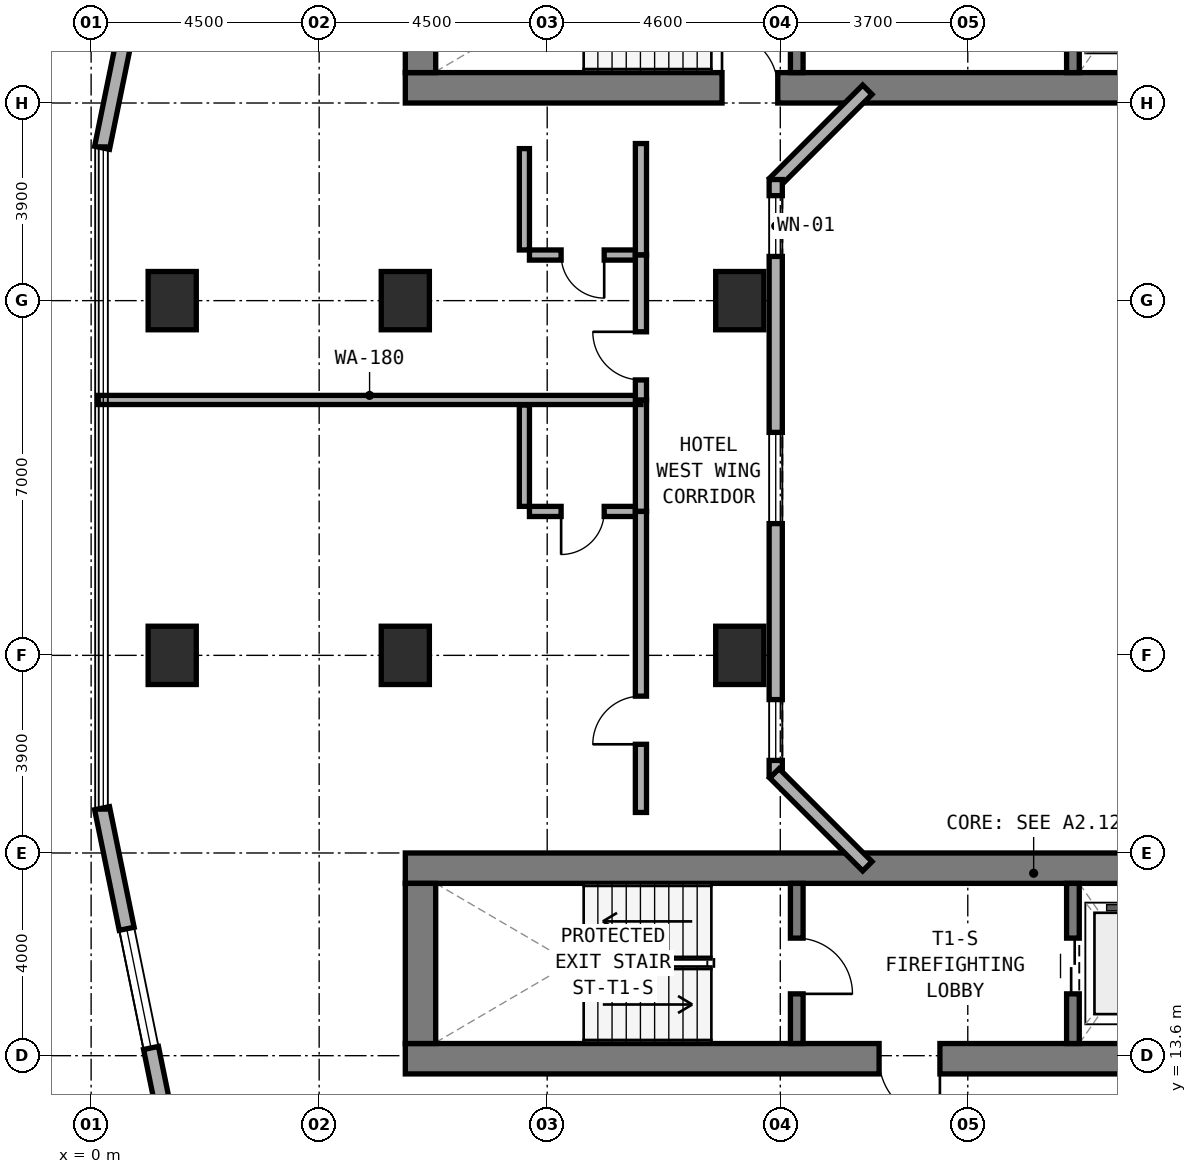
"""IFC4 building model, lengths in metres.
Left out: names, types, materials, properties, quantities, classifications, styles, units other than length and angle.
Written with IfcOpenShell. Run it as: python <this file> out.ifc"""

import sys

from ifc_helpers import new_model, si_unit, direction, frame, frame_2d, origin, origin_2d, place, context, subcontext, project, spatial, rectangle, extrude, element, fill, save


model = new_model("IFC4")
c1 = context("Model", 3, precision=1e-05, world=origin(), true_north=direction((0.0, 1.0)))
c2 = subcontext(c1, "Body", "Model", "MODEL_VIEW")
j1 = project(units=[si_unit("LENGTHUNIT", "METRE"), si_unit("PLANEANGLEUNIT", "RADIAN")], contexts=[c1])
p1 = place(None, origin())
s1 = spatial("IfcSite", under=j1, at=p1, CompositionType="ELEMENT")
p2 = place(p1, origin())
s2 = spatial("IfcBuilding", under=s1, at=p2, CompositionType="ELEMENT")
p3 = place(p2, frame((0.0, 0.0, 45.0)))
s3 = spatial("IfcBuildingStorey", under=s2, at=p3, CompositionType="ELEMENT", Elevation=45.0)
p4 = place(p3, frame((6.2, 32.7, 0.0), z_axis=(0.0, 0.0, 1.0), x_axis=(1.0, 0.0, 0.0)))
e1 = element("IfcWall", 1, at=p4, inside=s3, PredefinedType="SHEAR", context=c2, shape_type="SweptSolid", body=[
    extrude(rectangle(XDim=24.8, YDim=0.6, at=frame_2d((12.4, 0.0))), origin(), (0.0, 0.0, 1.0), 3.5),
])
p5 = place(p4, frame((6.25, 0.0, 0.0)))
e2 = element("IfcOpeningElement", 2, at=p5, cuts=e1, PredefinedType="OPENING", context=c2, shape_type="SweptSolid", body=[
    extrude(rectangle(XDim=1.1, YDim=2.15, at=frame_2d((0.55, 1.075))), frame((0.0, 0.31, 0.0), z_axis=(0.0, -1.0, 0.0), x_axis=(1.0, 0.0, 0.0)), (0.0, 0.0, 1.0), 0.62),
])
p6 = place(p3, frame((6.5, 33.0, 0.0), z_axis=(0.0, 0.0, 1.0), x_axis=(0.0, 1.0, 0.0)))
e3 = element("IfcWall", 3, at=p6, inside=s3, PredefinedType="SHEAR", context=c2, shape_type="SweptSolid", body=[
    extrude(rectangle(XDim=3.16, YDim=0.6, at=frame_2d((1.58, 0.0))), origin(), (0.0, 0.0, 1.0), 3.5),
])
p7 = place(p3, frame((13.925, 33.0, 0.0), z_axis=(0.0, 0.0, 1.0), x_axis=(0.0, 1.0, 0.0)))
e4 = element("IfcWall", 4, at=p7, inside=s3, PredefinedType="STANDARD", context=c2, shape_type="SweptSolid", body=[
    extrude(rectangle(XDim=3.16, YDim=0.25, at=frame_2d((1.58, 0.0))), origin(), (0.0, 0.0, 1.0), 3.22),
])
p8 = place(p7, frame((0.98, 0.0, 0.0)))
e5 = element("IfcOpeningElement", 5, at=p8, cuts=e4, PredefinedType="OPENING", context=c2, shape_type="SweptSolid", body=[
    extrude(rectangle(XDim=1.1, YDim=2.15, at=frame_2d((0.55, 1.075))), frame((0.0, 0.135, 0.0), z_axis=(0.0, -1.0, 0.0), x_axis=(1.0, 0.0, 0.0)), (0.0, 0.0, 1.0), 0.27),
])
p9 = place(p3, frame((19.375, 33.0, 0.0), z_axis=(0.0, 0.0, 1.0), x_axis=(0.0, 1.0, 0.0)))
e6 = element("IfcWall", 6, at=p9, inside=s3, PredefinedType="STANDARD", context=c2, shape_type="SweptSolid", body=[
    extrude(rectangle(XDim=3.16, YDim=0.25, at=frame_2d((1.58, 0.0))), origin(), (0.0, 0.0, 1.0), 3.22),
])
p10 = place(p9, frame((0.98, 0.0, 0.0)))
e7 = element("IfcOpeningElement", 7, at=p10, cuts=e6, PredefinedType="OPENING", context=c2, shape_type="SweptSolid", body=[
    extrude(rectangle(XDim=1.1, YDim=2.15, at=frame_2d((0.55, 1.075))), frame((0.0, 0.135, 0.0), z_axis=(0.0, -1.0, 0.0), x_axis=(1.0, 0.0, 0.0)), (0.0, 0.0, 1.0), 0.27),
])
p11 = place(p3, frame((6.2, 13.54, 0.0), z_axis=(0.0, 0.0, 1.0), x_axis=(1.0, 0.0, 0.0)))
e8 = element("IfcWall", 8, at=p11, inside=s3, PredefinedType="SHEAR", context=c2, shape_type="SweptSolid", body=[
    extrude(rectangle(XDim=24.8, YDim=0.6, at=frame_2d((12.4, 0.0))), origin(), (0.0, 0.0, 1.0), 3.5),
])
p12 = place(p11, frame((9.35, 0.0, 0.0)))
e9 = element("IfcOpeningElement", 9, at=p12, cuts=e8, PredefinedType="OPENING", context=c2, shape_type="SweptSolid", body=[
    extrude(rectangle(XDim=1.2, YDim=2.15, at=frame_2d((0.6, 1.075))), frame((0.0, 0.31, 0.0), z_axis=(0.0, -1.0, 0.0), x_axis=(1.0, 0.0, 0.0)), (0.0, 0.0, 1.0), 0.62),
])
p13 = place(p11, frame((17.14, 0.0, 0.0)))
e10 = element("IfcOpeningElement", 10, at=p13, cuts=e8, PredefinedType="OPENING", context=c2, shape_type="SweptSolid", body=[
    extrude(rectangle(XDim=0.85, YDim=2.1, at=frame_2d((0.425, 1.05))), frame((0.0, 0.31, 0.0), z_axis=(0.0, -1.0, 0.0), x_axis=(1.0, 0.0, 0.0)), (0.0, 0.0, 1.0), 0.62),
])
p14 = place(p3, frame((6.2, 17.3, 0.0), z_axis=(0.0, 0.0, 1.0), x_axis=(1.0, 0.0, 0.0)))
e11 = element("IfcWall", 11, at=p14, inside=s3, PredefinedType="SHEAR", context=c2, shape_type="SweptSolid", body=[
    extrude(rectangle(XDim=24.8, YDim=0.6, at=frame_2d((12.4, 0.0))), origin(), (0.0, 0.0, 1.0), 3.5),
])
p15 = place(p3, frame((6.5, 13.84, 0.0), z_axis=(0.0, 0.0, 1.0), x_axis=(0.0, 1.0, 0.0)))
e12 = element("IfcWall", 12, at=p15, inside=s3, PredefinedType="SHEAR", context=c2, shape_type="SweptSolid", body=[
    extrude(rectangle(XDim=3.16, YDim=0.6, at=frame_2d((1.58, 0.0))), origin(), (0.0, 0.0, 1.0), 3.5),
])
p16 = place(p3, frame((13.925, 13.84, 0.0), z_axis=(0.0, 0.0, 1.0), x_axis=(0.0, 1.0, 0.0)))
e13 = element("IfcWall", 13, at=p16, inside=s3, PredefinedType="STANDARD", context=c2, shape_type="SweptSolid", body=[
    extrude(rectangle(XDim=3.16, YDim=0.25, at=frame_2d((1.58, 0.0))), origin(), (0.0, 0.0, 1.0), 3.22),
])
p17 = place(p16, frame((0.98, 0.0, 0.0)))
e14 = element("IfcOpeningElement", 14, at=p17, cuts=e13, PredefinedType="OPENING", context=c2, shape_type="SweptSolid", body=[
    extrude(rectangle(XDim=1.1, YDim=2.15, at=frame_2d((0.55, 1.075))), frame((0.0, 0.135, 0.0), z_axis=(0.0, -1.0, 0.0), x_axis=(1.0, 0.0, 0.0)), (0.0, 0.0, 1.0), 0.27),
])
p18 = place(p3, frame((19.375, 13.84, 0.0), z_axis=(0.0, 0.0, 1.0), x_axis=(0.0, 1.0, 0.0)))
e15 = element("IfcWall", 15, at=p18, inside=s3, PredefinedType="STANDARD", context=c2, shape_type="SweptSolid", body=[
    extrude(rectangle(XDim=3.16, YDim=0.25, at=frame_2d((1.58, 0.0))), origin(), (0.0, 0.0, 1.0), 3.22),
])
p19 = place(p18, frame((0.98, 0.0, 0.0)))
e16 = element("IfcOpeningElement", 16, at=p19, cuts=e15, PredefinedType="OPENING", context=c2, shape_type="SweptSolid", body=[
    extrude(rectangle(XDim=1.1, YDim=2.15, at=frame_2d((0.55, 1.075))), frame((0.0, 0.135, 0.0), z_axis=(0.0, -1.0, 0.0), x_axis=(1.0, 0.0, 0.0)), (0.0, 0.0, 1.0), 0.27),
])
for number, where, z_axis, x_axis in (
    (17, (6.2, 21.5, 0.0), (0.0, 0.0, 1.0), (1.0, 0.0, 0.0)),
    (18, (6.2, 28.5, 0.0), (0.0, 0.0, 1.0), (1.0, 0.0, 0.0)),
    (19, (12.8, 21.5, 0.0), (0.0, 0.0, 1.0), (1.0, 0.0, 0.0)),
    (20, (12.8, 28.5, 0.0), (0.0, 0.0, 1.0), (1.0, 0.0, 0.0)),
    (21, (1.6, 21.5, 0.0), (0.0, 0.0, 1.0), (1.0, 0.0, 0.0)),
    (22, (1.6, 28.5, 0.0), (0.0, 0.0, 1.0), (1.0, 0.0, 0.0)),
):
    element("IfcColumn", number, at=place(p3, frame(where, z_axis=z_axis, x_axis=x_axis)), inside=s3, PredefinedType="COLUMN", context=c2, shape_type="SweptSolid", body=[
        extrude(rectangle(XDim=0.95, YDim=1.15, at=origin_2d()), origin(), (0.0, 0.0, 1.0), 3.5),
    ])
p20 = place(p3, frame((2.229, 41.378, 0.0), z_axis=(0.0, 0.0, 1.0), x_axis=(-0.199990901713, -0.979797754249, 0.0)))
e23 = element("IfcWall", 23, at=p20, inside=s3, PredefinedType="STANDARD", context=c2, shape_type="SweptSolid", body=[
    extrude(rectangle(XDim=10.065, YDim=0.3, at=frame_2d((5.033, 0.0))), origin(), (0.0, 0.0, 1.0), 3.22),
])
p21 = place(p20, frame((0.378, 0.0, 0.85)))
e24 = element("IfcOpeningElement", 24, at=p21, cuts=e23, PredefinedType="OPENING", context=c2, shape_type="SweptSolid", body=[
    extrude(rectangle(XDim=1.8, YDim=1.5, at=frame_2d((0.9, 0.75))), frame((0.0, 0.16, 0.0), z_axis=(0.0, -1.0, 0.0), x_axis=(1.0, 0.0, 0.0)), (0.0, 0.0, 1.0), 0.32),
])
p22 = place(p20, frame((5.236, 0.0, 0.8)))
e25 = element("IfcOpeningElement", 25, at=p22, cuts=e23, PredefinedType="OPENING", context=c2, shape_type="SweptSolid", body=[
    extrude(rectangle(XDim=2.4, YDim=1.6, at=frame_2d((1.2, 0.8))), frame((0.0, 0.16, 0.0), z_axis=(0.0, -1.0, 0.0), x_axis=(1.0, 0.0, 0.0)), (0.0, 0.0, 1.0), 0.32),
])
p23 = place(p3, frame((0.216, 18.484, 0.0), z_axis=(0.0, 0.0, 1.0), x_axis=(0.199990901713, -0.979797754249, 0.0)))
e26 = element("IfcWall", 26, at=p23, inside=s3, PredefinedType="STANDARD", context=c2, shape_type="SweptSolid", body=[
    extrude(rectangle(XDim=10.065, YDim=0.3, at=frame_2d((5.033, 0.0))), origin(), (0.0, 0.0, 1.0), 3.22),
])
p24 = place(p23, frame((2.429, 0.0, 0.8)))
e27 = element("IfcOpeningElement", 27, at=p24, cuts=e26, PredefinedType="OPENING", context=c2, shape_type="SweptSolid", body=[
    extrude(rectangle(XDim=2.4, YDim=1.6, at=frame_2d((1.2, 0.8))), frame((0.0, 0.16, 0.0), z_axis=(0.0, -1.0, 0.0), x_axis=(1.0, 0.0, 0.0)), (0.0, 0.0, 1.0), 0.32),
])
p25 = place(p23, frame((7.887, 0.0, 0.85)))
e28 = element("IfcOpeningElement", 28, at=p25, cuts=e26, PredefinedType="OPENING", context=c2, shape_type="SweptSolid", body=[
    extrude(rectangle(XDim=1.8, YDim=1.5, at=frame_2d((0.9, 0.75))), frame((0.0, 0.16, 0.0), z_axis=(0.0, -1.0, 0.0), x_axis=(1.0, 0.0, 0.0)), (0.0, 0.0, 1.0), 0.32),
])
p26 = place(p3, frame((15.318, 32.662, 0.0), z_axis=(0.0, 0.0, 1.0), x_axis=(-0.707106781187, -0.707106781187, 0.0)))
e29 = element("IfcWall", 29, at=p26, inside=s3, PredefinedType="STANDARD", context=c2, shape_type="SweptSolid", body=[
    extrude(rectangle(XDim=2.594, YDim=0.26, at=frame_2d((1.297, 0.0))), origin(), (0.0, 0.0, 1.0), 3.22),
])
p27 = place(p3, frame((13.51, 30.89, 0.0), z_axis=(0.0, 0.0, 1.0), x_axis=(0.0, -1.0, 0.0)))
e30 = element("IfcWall", 30, at=p27, inside=s3, PredefinedType="STANDARD", context=c2, shape_type="SweptSolid", body=[
    extrude(rectangle(XDim=11.78, YDim=0.26, at=frame_2d((5.89, 0.0))), origin(), (0.0, 0.0, 1.0), 3.22),
])
p28 = place(p27, frame((0.318, 0.0, 0.85)))
e31 = element("IfcOpeningElement", 31, at=p28, cuts=e30, PredefinedType="OPENING", context=c2, shape_type="SweptSolid", body=[
    extrude(rectangle(XDim=1.2, YDim=1.5, at=frame_2d((0.6, 0.75))), frame((0.0, 0.14, 0.0), z_axis=(0.0, -1.0, 0.0), x_axis=(1.0, 0.0, 0.0)), (0.0, 0.0, 1.0), 0.28),
])
p29 = place(p27, frame((4.99, 0.0, 0.85)))
e32 = element("IfcOpeningElement", 32, at=p29, cuts=e30, PredefinedType="OPENING", context=c2, shape_type="SweptSolid", body=[
    extrude(rectangle(XDim=1.8, YDim=1.5, at=frame_2d((0.9, 0.75))), frame((0.0, 0.14, 0.0), z_axis=(0.0, -1.0, 0.0), x_axis=(1.0, 0.0, 0.0)), (0.0, 0.0, 1.0), 0.28),
])
p30 = place(p27, frame((10.263, 0.0, 0.85)))
e33 = element("IfcOpeningElement", 33, at=p30, cuts=e30, PredefinedType="OPENING", context=c2, shape_type="SweptSolid", body=[
    extrude(rectangle(XDim=1.2, YDim=1.5, at=frame_2d((0.6, 0.75))), frame((0.0, 0.14, 0.0), z_axis=(0.0, -1.0, 0.0), x_axis=(1.0, 0.0, 0.0)), (0.0, 0.0, 1.0), 0.28),
])
p31 = place(p3, frame((13.484, 19.172, 0.0), z_axis=(0.0, 0.0, 1.0), x_axis=(0.707106781187, -0.707106781187, 0.0)))
e34 = element("IfcWall", 34, at=p31, inside=s3, PredefinedType="STANDARD", context=c2, shape_type="SweptSolid", body=[
    extrude(rectangle(XDim=2.594, YDim=0.26, at=frame_2d((1.297, 0.0))), origin(), (0.0, 0.0, 1.0), 3.22),
])
p32 = place(p3, frame((8.65, 24.34, 0.0), z_axis=(0.0, 0.0, 1.0), x_axis=(1.0, 0.0, 0.0)))
e35 = element("IfcWall", 35, at=p32, inside=s3, PredefinedType="PLUMBINGWALL", context=c2, shape_type="SweptSolid", body=[
    extrude(rectangle(XDim=2.1, YDim=0.2, at=frame_2d((1.05, 0.0))), origin(), (0.0, 0.0, 1.0), 3.22),
])
p33 = place(p32, frame((0.625, 0.0, 0.0)))
e36 = element("IfcOpeningElement", 36, at=p33, cuts=e35, PredefinedType="OPENING", context=c2, shape_type="SweptSolid", body=[
    extrude(rectangle(XDim=0.85, YDim=2.1, at=frame_2d((0.425, 1.05))), frame((0.0, 0.11, 0.0), z_axis=(0.0, -1.0, 0.0), x_axis=(1.0, 0.0, 0.0)), (0.0, 0.0, 1.0), 0.22),
])
p34 = place(p3, frame((8.55, 24.44, 0.0), z_axis=(0.0, 0.0, 1.0), x_axis=(0.0, 1.0, 0.0)))
e37 = element("IfcWall", 37, at=p34, inside=s3, PredefinedType="PLUMBINGWALL", context=c2, shape_type="SweptSolid", body=[
    extrude(rectangle(XDim=2.0, YDim=0.2, at=frame_2d((1.0, 0.0))), origin(), (0.0, 0.0, 1.0), 3.22),
])
p35 = place(p3, frame((10.85, 24.34, 0.0), z_axis=(0.0, 0.0, 1.0), x_axis=(0.0, 1.0, 0.0)))
e38 = element("IfcWall", 38, at=p35, inside=s3, PredefinedType="SOLIDWALL", context=c2, shape_type="SweptSolid", body=[
    extrude(rectangle(XDim=2.2, YDim=0.22, at=frame_2d((1.1, 0.0))), origin(), (0.0, 0.0, 1.0), 3.22),
])
p36 = place(p3, frame((10.85, 18.4, 0.0), z_axis=(0.0, 0.0, 1.0), x_axis=(0.0, 1.0, 0.0)))
e39 = element("IfcWall", 39, at=p36, inside=s3, PredefinedType="SOLIDWALL", context=c2, shape_type="SweptSolid", body=[
    extrude(rectangle(XDim=5.94, YDim=0.22, at=frame_2d((2.97, 0.0))), origin(), (0.0, 0.0, 1.0), 2.395),
])
p37 = place(p36, frame((1.345, 0.0, 0.0)))
e40 = element("IfcOpeningElement", 40, at=p37, cuts=e39, PredefinedType="OPENING", context=c2, shape_type="SweptSolid", body=[
    extrude(rectangle(XDim=0.95, YDim=2.1, at=frame_2d((0.475, 1.05))), frame((0.0, 0.12, 0.0), z_axis=(0.0, -1.0, 0.0), x_axis=(1.0, 0.0, 0.0)), (0.0, 0.0, 1.0), 0.24),
])
p38 = place(p3, frame((0.14, 26.54, 0.0), z_axis=(0.0, 0.0, 1.0), x_axis=(1.0, 0.0, 0.0)))
e41 = element("IfcWall", 41, at=p38, inside=s3, PredefinedType="SOLIDWALL", context=c2, shape_type="SweptSolid", body=[
    extrude(rectangle(XDim=10.71, YDim=0.18, at=frame_2d((5.355, 0.0))), origin(), (0.0, 0.0, 1.0), 2.745),
])
p39 = place(p3, frame((8.65, 29.4, 0.0), z_axis=(0.0, 0.0, 1.0), x_axis=(1.0, 0.0, 0.0)))
e42 = element("IfcWall", 42, at=p39, inside=s3, PredefinedType="PLUMBINGWALL", context=c2, shape_type="SweptSolid", body=[
    extrude(rectangle(XDim=2.1, YDim=0.2, at=frame_2d((1.05, 0.0))), origin(), (0.0, 0.0, 1.0), 3.22),
])
p40 = place(p39, frame((0.625, 0.0, 0.0)))
e43 = element("IfcOpeningElement", 43, at=p40, cuts=e42, PredefinedType="OPENING", context=c2, shape_type="SweptSolid", body=[
    extrude(rectangle(XDim=0.85, YDim=2.1, at=frame_2d((0.425, 1.05))), frame((0.0, 0.11, 0.0), z_axis=(0.0, -1.0, 0.0), x_axis=(1.0, 0.0, 0.0)), (0.0, 0.0, 1.0), 0.22),
])
p41 = place(p3, frame((8.55, 29.5, 0.0), z_axis=(0.0, 0.0, 1.0), x_axis=(0.0, 1.0, 0.0)))
e44 = element("IfcWall", 44, at=p41, inside=s3, PredefinedType="PLUMBINGWALL", context=c2, shape_type="SweptSolid", body=[
    extrude(rectangle(XDim=2.0, YDim=0.2, at=frame_2d((1.0, 0.0))), origin(), (0.0, 0.0, 1.0), 3.22),
])
p42 = place(p3, frame((10.85, 29.4, 0.0), z_axis=(0.0, 0.0, 1.0), x_axis=(0.0, 1.0, 0.0)))
e45 = element("IfcWall", 45, at=p42, inside=s3, PredefinedType="SOLIDWALL", context=c2, shape_type="SweptSolid", body=[
    extrude(rectangle(XDim=2.2, YDim=0.22, at=frame_2d((1.1, 0.0))), origin(), (0.0, 0.0, 1.0), 3.22),
])
p43 = place(p3, frame((10.85, 26.54, 0.0), z_axis=(0.0, 0.0, 1.0), x_axis=(0.0, 1.0, 0.0)))
e46 = element("IfcWall", 46, at=p43, inside=s3, PredefinedType="SOLIDWALL", context=c2, shape_type="SweptSolid", body=[
    extrude(rectangle(XDim=2.86, YDim=0.22, at=frame_2d((1.43, 0.0))), origin(), (0.0, 0.0, 1.0), 2.395),
])
p44 = place(p43, frame((0.395, 0.0, 0.0)))
e47 = element("IfcOpeningElement", 47, at=p44, cuts=e46, PredefinedType="OPENING", context=c2, shape_type="SweptSolid", body=[
    extrude(rectangle(XDim=0.95, YDim=2.1, at=frame_2d((0.475, 1.05))), frame((0.0, 0.12, 0.0), z_axis=(0.0, -1.0, 0.0), x_axis=(1.0, 0.0, 0.0)), (0.0, 0.0, 1.0), 0.24),
])
p45 = place(p24, origin())
e48 = element("IfcWindow", 48, at=p45, inside=s3, PartitioningType="SINGLE_PANEL", PredefinedType="WINDOW", context=c2, shape_type="SweptSolid", body=[
    extrude(rectangle(XDim=2.4, YDim=1.6, at=frame_2d((1.2, 0.8))), frame((0.0, 0.03, 0.0), z_axis=(0.0, -1.0, 0.0), x_axis=(1.0, 0.0, 0.0)), (0.0, 0.0, 1.0), 0.06),
])
fill(e27, e48)
p46 = place(p28, origin())
e49 = element("IfcWindow", 49, at=p46, inside=s3, PartitioningType="SINGLE_PANEL", PredefinedType="WINDOW", context=c2, shape_type="SweptSolid", body=[
    extrude(rectangle(XDim=1.2, YDim=1.5, at=frame_2d((0.6, 0.75))), frame((0.0, 0.03, 0.0), z_axis=(0.0, -1.0, 0.0), x_axis=(1.0, 0.0, 0.0)), (0.0, 0.0, 1.0), 0.06),
])
fill(e31, e49)
p47 = place(p29, origin())
e50 = element("IfcWindow", 50, at=p47, inside=s3, PartitioningType="SINGLE_PANEL", PredefinedType="WINDOW", context=c2, shape_type="SweptSolid", body=[
    extrude(rectangle(XDim=1.8, YDim=1.5, at=frame_2d((0.9, 0.75))), frame((0.0, 0.03, 0.0), z_axis=(0.0, -1.0, 0.0), x_axis=(1.0, 0.0, 0.0)), (0.0, 0.0, 1.0), 0.06),
])
fill(e32, e50)
p48 = place(p30, origin())
e51 = element("IfcWindow", 51, at=p48, inside=s3, PartitioningType="SINGLE_PANEL", PredefinedType="WINDOW", context=c2, shape_type="SweptSolid", body=[
    extrude(rectangle(XDim=1.2, YDim=1.5, at=frame_2d((0.6, 0.75))), frame((0.0, 0.03, 0.0), z_axis=(0.0, -1.0, 0.0), x_axis=(1.0, 0.0, 0.0)), (0.0, 0.0, 1.0), 0.06),
])
fill(e33, e51)
p49 = place(p17, frame((1.1, 0.0, 0.0), z_axis=(0.0, 0.0, 1.0), x_axis=(-1.0, 0.0, 0.0)))
e52 = element("IfcDoor", 52, at=p49, inside=s3, OperationType="SINGLE_SWING_RIGHT", PredefinedType="DOOR", context=c2, shape_type="SweptSolid", body=[
    extrude(rectangle(XDim=1.1, YDim=2.15, at=frame_2d((0.55, 1.075))), frame((0.0, 0.025, 0.0), z_axis=(0.0, -1.0, 0.0), x_axis=(1.0, 0.0, 0.0)), (0.0, 0.0, 1.0), 0.05),
])
fill(e14, e52)
p50 = place(p12, frame((1.2, 0.0, 0.0), z_axis=(0.0, 0.0, 1.0), x_axis=(-1.0, 0.0, 0.0)))
e53 = element("IfcDoor", 53, at=p50, inside=s3, OperationType="SINGLE_SWING_LEFT", PredefinedType="DOOR", context=c2, shape_type="SweptSolid", body=[
    extrude(rectangle(XDim=1.2, YDim=2.15, at=frame_2d((0.6, 1.075))), frame((0.0, 0.025, 0.0), z_axis=(0.0, -1.0, 0.0), x_axis=(1.0, 0.0, 0.0)), (0.0, 0.0, 1.0), 0.05),
])
fill(e9, e53)
p51 = place(p19, origin())
e54 = element("IfcDoor", 54, at=p51, inside=s3, OperationType="DOUBLE_DOOR_SLIDING", PredefinedType="DOOR", context=c2, shape_type="SweptSolid", body=[
    extrude(rectangle(XDim=1.1, YDim=2.15, at=frame_2d((0.55, 1.075))), frame((0.0, 0.025, 0.0), z_axis=(0.0, -1.0, 0.0), x_axis=(1.0, 0.0, 0.0)), (0.0, 0.0, 1.0), 0.05),
])
fill(e16, e54)
p52 = place(p5, origin())
e55 = element("IfcDoor", 55, at=p52, inside=s3, OperationType="SINGLE_SWING_LEFT", PredefinedType="DOOR", context=c2, shape_type="SweptSolid", body=[
    extrude(rectangle(XDim=1.1, YDim=2.15, at=frame_2d((0.55, 1.075))), frame((0.0, 0.025, 0.0), z_axis=(0.0, -1.0, 0.0), x_axis=(1.0, 0.0, 0.0)), (0.0, 0.0, 1.0), 0.05),
])
fill(e2, e55)
p53 = place(p33, frame((0.85, 0.0, 0.0), z_axis=(0.0, 0.0, 1.0), x_axis=(-1.0, 0.0, 0.0)))
e56 = element("IfcDoor", 56, at=p53, inside=s3, OperationType="SINGLE_SWING_RIGHT", PredefinedType="DOOR", context=c2, shape_type="SweptSolid", body=[
    extrude(rectangle(XDim=0.85, YDim=2.1, at=frame_2d((0.425, 1.05))), frame((0.0, 0.025, 0.0), z_axis=(0.0, -1.0, 0.0), x_axis=(1.0, 0.0, 0.0)), (0.0, 0.0, 1.0), 0.05),
])
fill(e36, e56)
p54 = place(p37, origin())
e57 = element("IfcDoor", 57, at=p54, inside=s3, OperationType="SINGLE_SWING_LEFT", PredefinedType="DOOR", context=c2, shape_type="SweptSolid", body=[
    extrude(rectangle(XDim=0.95, YDim=2.1, at=frame_2d((0.475, 1.05))), frame((0.0, 0.025, 0.0), z_axis=(0.0, -1.0, 0.0), x_axis=(1.0, 0.0, 0.0)), (0.0, 0.0, 1.0), 0.05),
])
fill(e40, e57)
p55 = place(p40, frame((0.85, 0.0, 0.0), z_axis=(0.0, 0.0, 1.0), x_axis=(-1.0, 0.0, 0.0)))
e58 = element("IfcDoor", 58, at=p55, inside=s3, OperationType="SINGLE_SWING_LEFT", PredefinedType="DOOR", context=c2, shape_type="SweptSolid", body=[
    extrude(rectangle(XDim=0.85, YDim=2.1, at=frame_2d((0.425, 1.05))), frame((0.0, 0.025, 0.0), z_axis=(0.0, -1.0, 0.0), x_axis=(1.0, 0.0, 0.0)), (0.0, 0.0, 1.0), 0.05),
])
fill(e43, e58)
p56 = place(p44, origin())
e59 = element("IfcDoor", 59, at=p56, inside=s3, OperationType="SINGLE_SWING_RIGHT", PredefinedType="DOOR", context=c2, shape_type="SweptSolid", body=[
    extrude(rectangle(XDim=0.95, YDim=2.1, at=frame_2d((0.475, 1.05))), frame((0.0, 0.025, 0.0), z_axis=(0.0, -1.0, 0.0), x_axis=(1.0, 0.0, 0.0)), (0.0, 0.0, 1.0), 0.05),
])
fill(e47, e59)
save(model, sys.argv[1])
